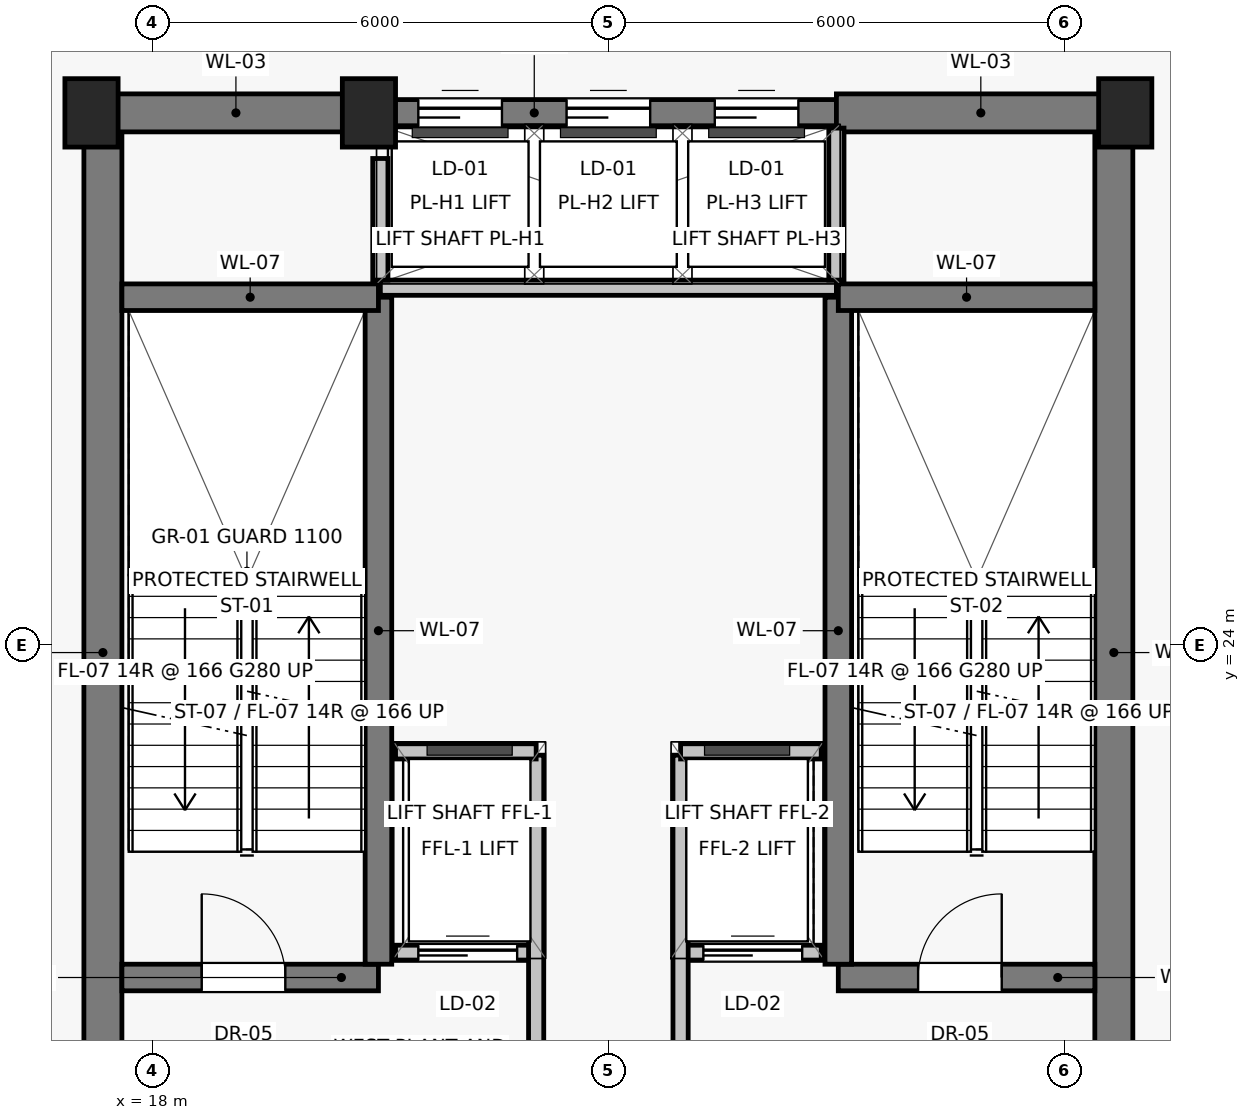
"""IFC4 building model, lengths in metres.
Left out: names, types, materials, properties, quantities, classifications, styles, units other than length and angle.
Written with IfcOpenShell. Run it as: python <this file> out.ifc"""

import sys

from ifc_helpers import new_model, si_unit, direction, frame, frame_2d, origin, origin_2d, place, context, subcontext, project, spatial, rectangle, extrude, source, transform, mapped, element, fill, save


model = new_model("IFC4")
c1 = context("Model", 3, precision=1e-05, world=origin(), true_north=direction((0.0, 1.0)))
c2 = subcontext(c1, "Body", "Model", "MODEL_VIEW")
j1 = project(units=[si_unit("LENGTHUNIT", "METRE"), si_unit("PLANEANGLEUNIT", "RADIAN")], contexts=[c1])
p1 = place(None, origin())
s1 = spatial("IfcSite", under=j1, at=p1, CompositionType="ELEMENT")
p2 = place(p1, origin())
s2 = spatial("IfcBuilding", under=s1, at=p2, CompositionType="ELEMENT")
p3 = place(p2, frame((0.0, 0.0, 225.4)))
s3 = spatial("IfcBuildingStorey", under=s2, at=p3, CompositionType="ELEMENT", Elevation=225.4)
for number, where, z_axis, x_axis in (
    (1, (17.2, 31.0, 0.0), (0.0, 0.0, 1.0), (1.0, 0.0, 0.0)),
    (2, (20.85, 31.0, 0.0), (0.0, 0.0, 1.0), (1.0, 0.0, 0.0)),
    (3, (30.8, 31.0, 0.0), (0.0, 0.0, 1.0), (1.0, 0.0, 0.0)),
):
    element("IfcColumn", number, at=place(p3, frame(where, z_axis=z_axis, x_axis=x_axis)), inside=s3, PredefinedType="PILASTER", context=c2, shape_type="SweptSolid", body=[
        extrude(rectangle(XDim=0.7, YDim=0.9, at=origin_2d()), origin(), (0.0, 0.0, 1.0), 4.65),
    ])
for number, where, z_axis, x_axis in (
    (4, (17.35, 16.8, 0.0), (0.0, 0.0, 1.0), (0.0, 1.0, 0.0)),
    (5, (30.65, 16.8, 0.0), (0.0, 0.0, 1.0), (0.0, 1.0, 0.0)),
):
    element("IfcWall", number, at=place(p3, frame(where, z_axis=z_axis, x_axis=x_axis)), inside=s3, PredefinedType="SHEAR", context=c2, shape_type="SweptSolid", body=[
        extrude(rectangle(XDim=14.2, YDim=0.5, at=frame_2d((7.1, 0.0))), origin(), (0.0, 0.0, 1.0), 4.415),
    ])
p4 = place(p3, frame((17.2, 31.0, 0.0), z_axis=(0.0, 0.0, 1.0), x_axis=(1.0, 0.0, 0.0)))
e6 = element("IfcWall", 6, at=p4, inside=s3, PredefinedType="SHEAR", context=c2, shape_type="SweptSolid", body=[
    extrude(rectangle(XDim=3.8, YDim=0.5, at=frame_2d((1.9, 0.0))), origin(), (0.0, 0.0, 1.0), 4.415),
])
p5 = place(p3, frame((21.0, 31.0, 0.0), z_axis=(0.0, 0.0, 1.0), x_axis=(1.0, 0.0, 0.0)))
e7 = element("IfcWall", 7, at=p5, inside=s3, PredefinedType="SHEAR", context=c2, shape_type="SweptSolid", body=[
    extrude(rectangle(XDim=6.0, YDim=0.35, at=frame_2d((3.0, 0.0))), origin(), (0.0, 0.0, 1.0), 4.415),
])
p6 = place(p5, frame((0.5, 0.0, 0.0)))
e8 = element("IfcOpeningElement", 8, at=p6, cuts=e7, PredefinedType="OPENING", context=c2, shape_type="SweptSolid", body=[
    extrude(rectangle(XDim=1.1, YDim=2.08, at=frame_2d((0.55, 1.04))), frame((0.0, 0.185, 0.0), z_axis=(0.0, -1.0, 0.0), x_axis=(1.0, 0.0, 0.0)), (0.0, 0.0, 1.0), 0.37),
])
p7 = place(p5, frame((2.45, 0.0, 0.0)))
e9 = element("IfcOpeningElement", 9, at=p7, cuts=e7, PredefinedType="OPENING", context=c2, shape_type="SweptSolid", body=[
    extrude(rectangle(XDim=1.1, YDim=2.08, at=frame_2d((0.55, 1.04))), frame((0.0, 0.185, 0.0), z_axis=(0.0, -1.0, 0.0), x_axis=(1.0, 0.0, 0.0)), (0.0, 0.0, 1.0), 0.37),
])
p8 = place(p5, frame((4.4, 0.0, 0.0)))
e10 = element("IfcOpeningElement", 10, at=p8, cuts=e7, PredefinedType="OPENING", context=c2, shape_type="SweptSolid", body=[
    extrude(rectangle(XDim=1.1, YDim=2.08, at=frame_2d((0.55, 1.04))), frame((0.0, 0.185, 0.0), z_axis=(0.0, -1.0, 0.0), x_axis=(1.0, 0.0, 0.0)), (0.0, 0.0, 1.0), 0.37),
])
p9 = place(p3, frame((27.0, 31.0, 0.0), z_axis=(0.0, 0.0, 1.0), x_axis=(1.0, 0.0, 0.0)))
e11 = element("IfcWall", 11, at=p9, inside=s3, PredefinedType="SHEAR", context=c2, shape_type="SweptSolid", body=[
    extrude(rectangle(XDim=3.8, YDim=0.5, at=frame_2d((1.9, 0.0))), origin(), (0.0, 0.0, 1.0), 4.415),
])
p10 = place(p3, frame((17.6, 19.625, 0.0), z_axis=(0.0, 0.0, 1.0), x_axis=(1.0, 0.0, 0.0)))
e12 = element("IfcWall", 12, at=p10, inside=s3, PredefinedType="SHEAR", context=c2, shape_type="SweptSolid", body=[
    extrude(rectangle(XDim=3.375, YDim=0.35, at=frame_2d((1.688, 0.0))), origin(), (0.0, 0.0, 1.0), 4.415),
])
p11 = place(p10, frame((1.05, 0.0, 0.0)))
e13 = element("IfcOpeningElement", 13, at=p11, cuts=e12, PredefinedType="OPENING", context=c2, shape_type="SweptSolid", body=[
    extrude(rectangle(XDim=1.1, YDim=2.03, at=frame_2d((0.55, 1.015))), frame((0.0, 0.185, 0.0), z_axis=(0.0, -1.0, 0.0), x_axis=(1.0, 0.0, 0.0)), (0.0, 0.0, 1.0), 0.37),
])
p12 = place(p3, frame((21.2, 19.95, 0.0), z_axis=(0.0, 0.0, 1.0), x_axis=(1.0, 0.0, 0.0)))
e14 = element("IfcWall", 14, at=p12, inside=s3, PredefinedType="SOLIDWALL", context=c2, shape_type="SweptSolid", body=[
    extrude(rectangle(XDim=1.85, YDim=0.2, at=frame_2d((0.925, 0.0))), origin(), (0.0, 0.0, 1.0), 4.415),
])
p13 = place(p12, frame((0.3, 0.0, 0.0)))
e15 = element("IfcOpeningElement", 15, at=p13, cuts=e14, PredefinedType="OPENING", context=c2, shape_type="SweptSolid", body=[
    extrude(rectangle(XDim=1.3, YDim=2.25, at=frame_2d((0.65, 1.125))), frame((0.0, 0.11, 0.0), z_axis=(0.0, -1.0, 0.0), x_axis=(1.0, 0.0, 0.0)), (0.0, 0.0, 1.0), 0.22),
])
p14 = place(p3, frame((24.95, 19.95, 0.0), z_axis=(0.0, 0.0, 1.0), x_axis=(1.0, 0.0, 0.0)))
e16 = element("IfcWall", 16, at=p14, inside=s3, PredefinedType="SOLIDWALL", context=c2, shape_type="SweptSolid", body=[
    extrude(rectangle(XDim=1.85, YDim=0.2, at=frame_2d((0.925, 0.0))), origin(), (0.0, 0.0, 1.0), 4.415),
])
p15 = place(p14, frame((0.3, 0.0, 0.0)))
e17 = element("IfcOpeningElement", 17, at=p15, cuts=e16, PredefinedType="OPENING", context=c2, shape_type="SweptSolid", body=[
    extrude(rectangle(XDim=1.3, YDim=2.25, at=frame_2d((0.65, 1.125))), frame((0.0, 0.11, 0.0), z_axis=(0.0, -1.0, 0.0), x_axis=(1.0, 0.0, 0.0)), (0.0, 0.0, 1.0), 0.22),
])
p16 = place(p3, frame((27.025, 19.625, 0.0), z_axis=(0.0, 0.0, 1.0), x_axis=(1.0, 0.0, 0.0)))
e18 = element("IfcWall", 18, at=p16, inside=s3, PredefinedType="SHEAR", context=c2, shape_type="SweptSolid", body=[
    extrude(rectangle(XDim=3.375, YDim=0.35, at=frame_2d((1.688, 0.0))), origin(), (0.0, 0.0, 1.0), 4.415),
])
p17 = place(p16, frame((1.05, 0.0, 0.0)))
e19 = element("IfcOpeningElement", 19, at=p17, cuts=e18, PredefinedType="OPENING", context=c2, shape_type="SweptSolid", body=[
    extrude(rectangle(XDim=1.1, YDim=2.03, at=frame_2d((0.55, 1.015))), frame((0.0, 0.185, 0.0), z_axis=(0.0, -1.0, 0.0), x_axis=(1.0, 0.0, 0.0)), (0.0, 0.0, 1.0), 0.37),
])
for number, where, z_axis, x_axis in (
    (20, (20.975, 19.8, 0.0), (0.0, 0.0, 1.0), (0.0, 1.0, 0.0)),
    (21, (27.025, 19.8, 0.0), (0.0, 0.0, 1.0), (0.0, 1.0, 0.0)),
):
    element("IfcWall", number, at=place(p3, frame(where, z_axis=z_axis, x_axis=x_axis)), inside=s3, PredefinedType="SHEAR", context=c2, shape_type="SweptSolid", body=[
        extrude(rectangle(XDim=8.775, YDim=0.35, at=frame_2d((4.387, 0.0))), origin(), (0.0, 0.0, 1.0), 4.415),
    ])
for number, where, z_axis, x_axis in (
    (22, (17.6, 28.575, 0.0), (0.0, 0.0, 1.0), (1.0, 0.0, 0.0)),
    (23, (27.025, 28.575, 0.0), (0.0, 0.0, 1.0), (1.0, 0.0, 0.0)),
):
    element("IfcWall", number, at=place(p3, frame(where, z_axis=z_axis, x_axis=x_axis)), inside=s3, PredefinedType="SHEAR", context=c2, shape_type="SweptSolid", body=[
        extrude(rectangle(XDim=3.375, YDim=0.35, at=frame_2d((1.688, 0.0))), origin(), (0.0, 0.0, 1.0), 4.415),
    ])
for number, where, z_axis, x_axis in (
    (24, (23.05, 16.95, 0.0), (0.0, 0.0, 1.0), (0.0, 1.0, 0.0)),
    (25, (24.95, 16.95, 0.0), (0.0, 0.0, 1.0), (0.0, 1.0, 0.0)),
):
    element("IfcWall", number, at=place(p3, frame(where, z_axis=z_axis, x_axis=x_axis)), inside=s3, PredefinedType="SOLIDWALL", context=c2, shape_type="SweptSolid", body=[
        extrude(rectangle(XDim=5.6, YDim=0.2, at=frame_2d((2.8, 0.0))), origin(), (0.0, 0.0, 1.0), 2.215),
    ])
for number, where, z_axis, x_axis in (
    (26, (21.2, 22.6, 0.0), (0.0, 0.0, 1.0), (1.0, 0.0, 0.0)),
    (27, (24.95, 22.6, 0.0), (0.0, 0.0, 1.0), (1.0, 0.0, 0.0)),
):
    element("IfcWall", number, at=place(p3, frame(where, z_axis=z_axis, x_axis=x_axis)), inside=s3, PredefinedType="SOLIDWALL", context=c2, shape_type="SweptSolid", body=[
        extrude(rectangle(XDim=1.85, YDim=0.2, at=frame_2d((0.925, 0.0))), origin(), (0.0, 0.0, 1.0), 4.415),
    ])
p18 = place(p3, frame((21.0, 28.7, 0.0), z_axis=(0.0, 0.0, 1.0), x_axis=(1.0, 0.0, 0.0)))
e28 = element("IfcWall", 28, at=p18, inside=s3, PredefinedType="SOLIDWALL", context=c2, shape_type="SweptSolid", body=[
    extrude(rectangle(XDim=6.0, YDim=0.2, at=frame_2d((3.0, 0.0))), origin(), (0.0, 0.0, 1.0), 4.415),
])
p19 = place(p3, frame((21.0, 28.8, 0.0), z_axis=(0.0, 0.0, 1.0), x_axis=(0.0, 1.0, 0.0)))
e29 = element("IfcWall", 29, at=p19, inside=s3, PredefinedType="SOLIDWALL", context=c2, shape_type="SweptSolid", body=[
    extrude(rectangle(XDim=1.6, YDim=0.2, at=frame_2d((0.8, 0.0))), origin(), (0.0, 0.0, 1.0), 4.415),
])
p20 = place(p3, frame((27.0, 28.8, 0.0), z_axis=(0.0, 0.0, 1.0), x_axis=(0.0, 1.0, 0.0)))
e30 = element("IfcWall", 30, at=p20, inside=s3, PredefinedType="SOLIDWALL", context=c2, shape_type="SweptSolid", body=[
    extrude(rectangle(XDim=2.0, YDim=0.2, at=frame_2d((1.0, 0.0))), origin(), (0.0, 0.0, 1.0), 4.415),
])
m1 = source(origin(), c2, "Body", "SweptSolid", [
    extrude(rectangle(XDim=1.1, YDim=2.08, at=frame_2d((0.55, 1.04))), frame((0.0, 0.025, 0.0), z_axis=(0.0, -1.0, 0.0), x_axis=(1.0, 0.0, 0.0)), (0.0, 0.0, 1.0), 0.05),
])
p21 = place(p6, origin())
e31 = element("IfcDoor", 31, at=p21, inside=s3, OperationType="SLIDING_TO_LEFT", PredefinedType="DOOR", context=c2, shape_type="MappedRepresentation", body=[
    mapped(m1, transform((0.0, 0.0, 0.0), scale=1.0)),
])
fill(e8, e31)
p22 = place(p7, origin())
e32 = element("IfcDoor", 32, at=p22, inside=s3, OperationType="SLIDING_TO_LEFT", PredefinedType="DOOR", context=c2, shape_type="MappedRepresentation", body=[
    mapped(m1, transform((0.0, 0.0, 0.0), scale=1.0)),
])
fill(e9, e32)
p23 = place(p8, origin())
e33 = element("IfcDoor", 33, at=p23, inside=s3, OperationType="SLIDING_TO_LEFT", PredefinedType="DOOR", context=c2, shape_type="MappedRepresentation", body=[
    mapped(m1, transform((0.0, 0.0, 0.0), scale=1.0)),
])
fill(e10, e33)
m2 = source(origin(), c2, "Body", "SweptSolid", [
    extrude(rectangle(XDim=1.1, YDim=2.03, at=frame_2d((0.55, 1.015))), frame((0.0, 0.025, 0.0), z_axis=(0.0, -1.0, 0.0), x_axis=(1.0, 0.0, 0.0)), (0.0, 0.0, 1.0), 0.05),
])
p24 = place(p11, origin())
e34 = element("IfcDoor", 34, at=p24, inside=s3, OperationType="SINGLE_SWING_LEFT", PredefinedType="DOOR", context=c2, shape_type="MappedRepresentation", body=[
    mapped(m2, transform((0.0, 0.0, 0.0), scale=1.0)),
])
fill(e13, e34)
m3 = source(origin(), c2, "Body", "SweptSolid", [
    extrude(rectangle(XDim=1.3, YDim=2.25, at=frame_2d((0.65, 1.125))), frame((0.0, 0.025, 0.0), z_axis=(0.0, -1.0, 0.0), x_axis=(1.0, 0.0, 0.0)), (0.0, 0.0, 1.0), 0.05),
])
p25 = place(p13, origin())
e35 = element("IfcDoor", 35, at=p25, inside=s3, OperationType="SLIDING_TO_LEFT", PredefinedType="DOOR", context=c2, shape_type="MappedRepresentation", body=[
    mapped(m3, transform((0.0, 0.0, 0.0), scale=1.0)),
])
fill(e15, e35)
p26 = place(p15, origin())
e36 = element("IfcDoor", 36, at=p26, inside=s3, OperationType="SLIDING_TO_LEFT", PredefinedType="DOOR", context=c2, shape_type="MappedRepresentation", body=[
    mapped(m3, transform((0.0, 0.0, 0.0), scale=1.0)),
])
fill(e17, e36)
p27 = place(p17, origin())
e37 = element("IfcDoor", 37, at=p27, inside=s3, OperationType="SINGLE_SWING_RIGHT", PredefinedType="DOOR", context=c2, shape_type="MappedRepresentation", body=[
    mapped(m2, transform((0.0, 0.0, 0.0), scale=1.0)),
])
fill(e19, e37)
save(model, sys.argv[1])
